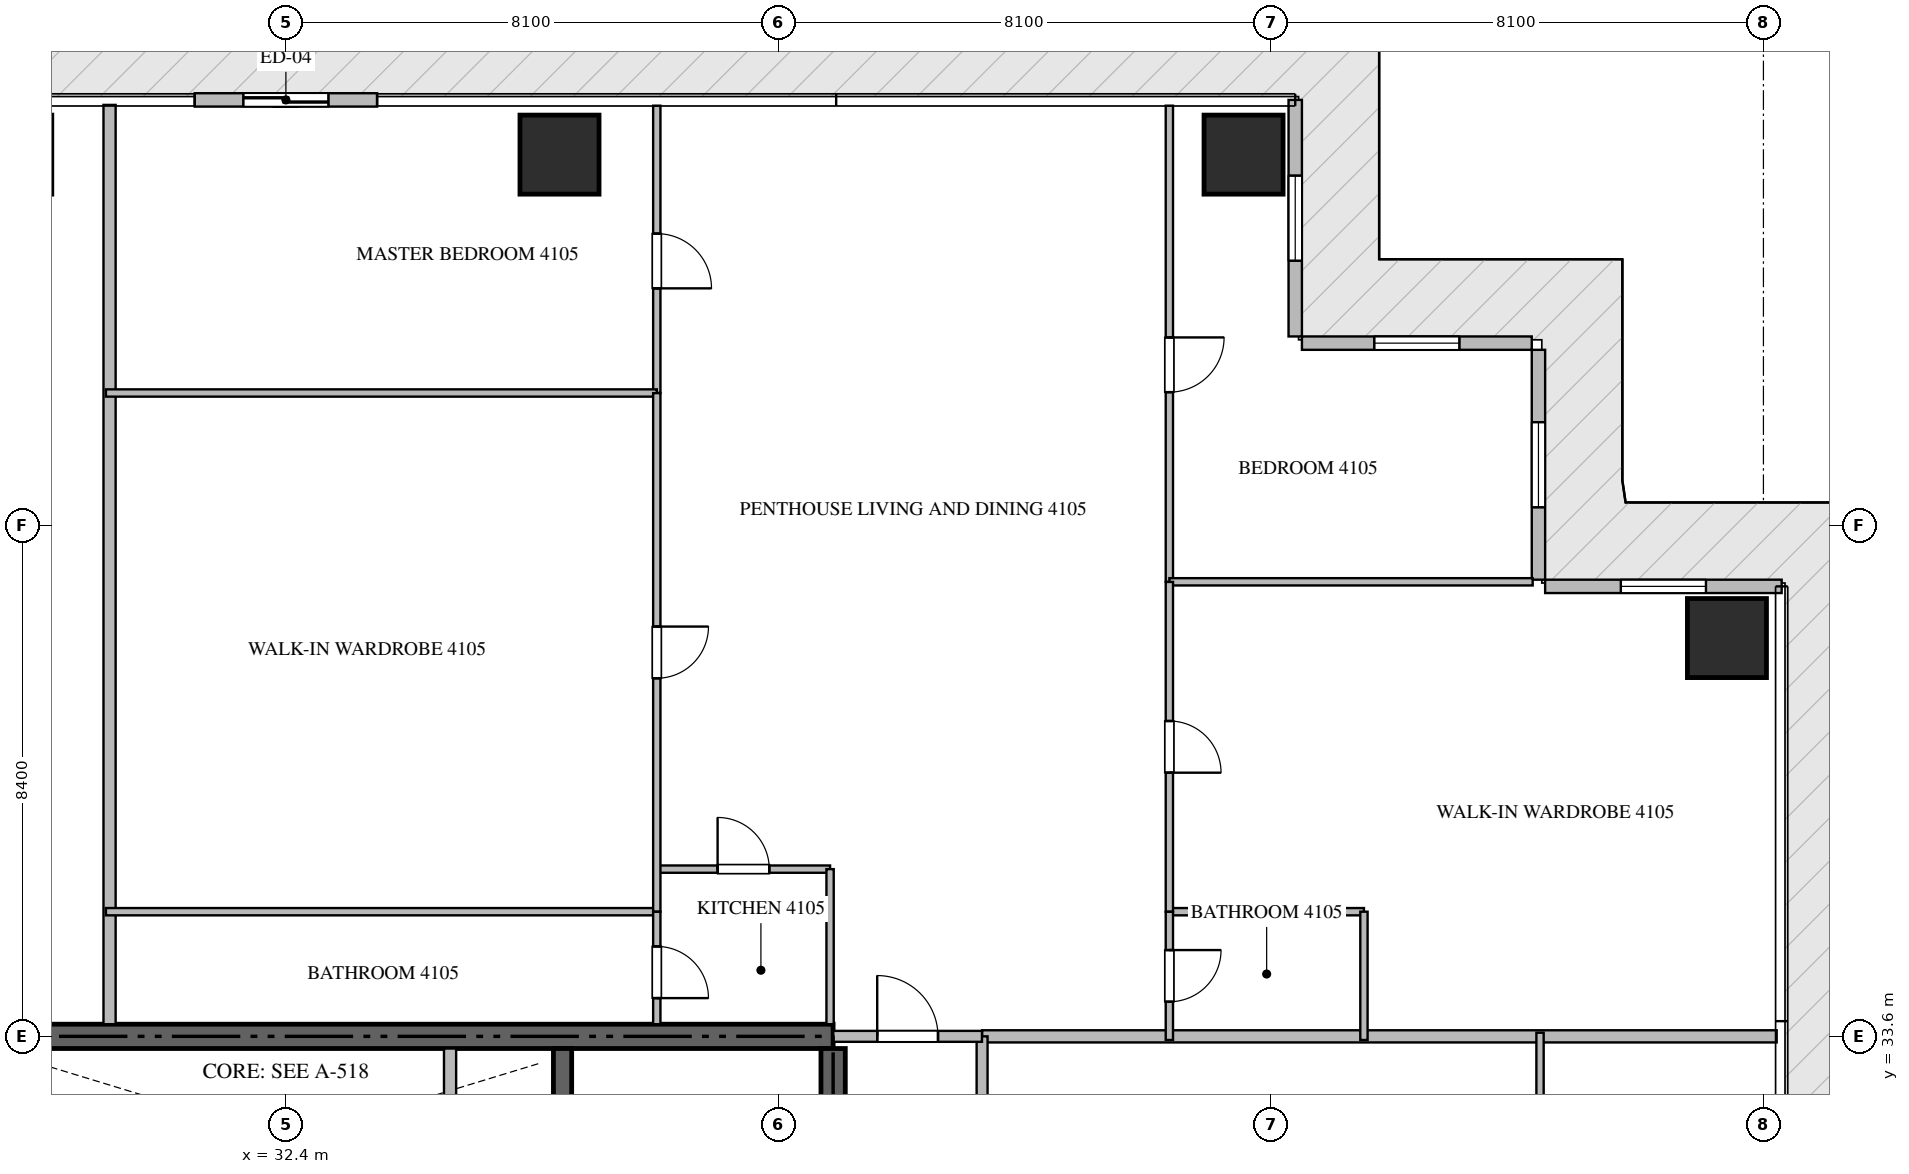
"""IFC4 building model, lengths in metres.
Left out: names, types, materials, properties, quantities, classifications, styles, units other than length and angle.
Written with IfcOpenShell. Run it as: python <this file> out.ifc"""

import sys

from ifc_helpers import new_model, si_unit, direction, frame, frame_2d, origin, origin_2d, place, context, subcontext, project, spatial, rectangle, extrude, source, transform, mapped, element, fill, save


model = new_model("IFC4")
c1 = context("Model", 3, precision=1e-05, world=origin(), true_north=direction((0.0, 1.0)))
c2 = subcontext(c1, "Body", "Model", "MODEL_VIEW")
j1 = project(units=[si_unit("LENGTHUNIT", "METRE"), si_unit("PLANEANGLEUNIT", "RADIAN")], contexts=[c1])
p1 = place(None, origin())
s1 = spatial("IfcSite", under=j1, at=p1, CompositionType="ELEMENT")
p2 = place(p1, origin())
s2 = spatial("IfcBuilding", under=s1, at=p2, CompositionType="ELEMENT")
p3 = place(p2, frame((0.0, 0.0, 165.15)))
s3 = spatial("IfcBuildingStorey", under=s2, at=p3, CompositionType="ELEMENT", Elevation=165.15)
p4 = place(p3, frame((41.4, 33.6, -0.26), z_axis=(0.0, 0.0, 1.0), x_axis=(-1.0, 0.0, 0.0)))
e1 = element("IfcWall", 1, at=p4, inside=s3, PredefinedType="SHEAR", context=c2, shape_type="SweptSolid", body=[
    extrude(rectangle(XDim=18.0, YDim=0.4, at=frame_2d((9.0, 0.0))), origin(), (0.0, 0.0, 1.0), 3.748),
])
p5 = place(p3, frame((41.4, 27.75, -0.26), z_axis=(0.0, 0.0, 1.0), x_axis=(0.0, 1.0, 0.0)))
e2 = element("IfcWall", 2, at=p5, inside=s3, PredefinedType="SHEAR", context=c2, shape_type="SweptSolid", body=[
    extrude(rectangle(XDim=5.65, YDim=0.4, at=frame_2d((2.825, 0.0))), origin(), (0.0, 0.0, 1.0), 3.748),
])
p6 = place(p3, frame((36.95, 27.05, -0.26), z_axis=(0.0, 0.0, 1.0), x_axis=(0.0, 1.0, 0.0)))
e3 = element("IfcWall", 3, at=p6, inside=s3, PredefinedType="SHEAR", context=c2, shape_type="SweptSolid", body=[
    extrude(rectangle(XDim=6.35, YDim=0.3, at=frame_2d((3.175, 0.0))), origin(), (0.0, 0.0, 1.0), 3.748),
])
m1 = source(origin(), c2, "Body", "SweptSolid", [
    extrude(rectangle(XDim=1.3, YDim=1.3, at=origin_2d()), origin(), (0.0, 0.0, 1.0), 3.75),
])
for number, where, z_axis, x_axis in (
    (4, (36.9, 48.1, -0.26), (0.0, 0.0, 1.0), (1.0, 0.0, 0.0)),
    (5, (48.15, 48.1, -0.26), (0.0, 0.0, 1.0), (1.0, 0.0, 0.0)),
    (6, (56.1, 40.15, -0.26), (0.0, 0.0, 1.0), (1.0, 0.0, 0.0)),
):
    element("IfcColumn", number, at=place(p3, frame(where, z_axis=z_axis, x_axis=x_axis)), inside=s3, PredefinedType="COLUMN", context=c2, shape_type="MappedRepresentation", body=[
        mapped(m1, transform((0.0, 0.0, 0.0), scale=1.0)),
    ])
p7 = place(p3, frame((57.0, 41.0, 0.0), z_axis=(0.0, 0.0, 1.0), x_axis=(-1.0, 0.0, 0.0)))
e7 = element("IfcWall", 7, at=p7, inside=s3, PredefinedType="ELEMENTEDWALL", context=c2, shape_type="SweptSolid", body=[
    extrude(rectangle(XDim=3.89, YDim=0.22, at=frame_2d((1.945, 0.0))), origin(), (0.0, 0.0, 1.0), 3.475),
])
p8 = place(p7, frame((1.245, 0.0, 0.65)))
e8 = element("IfcOpeningElement", 8, at=p8, cuts=e7, PredefinedType="OPENING", context=c2, shape_type="SweptSolid", body=[
    extrude(rectangle(XDim=1.4, YDim=2.05, at=frame_2d((0.7, 1.025))), frame((0.0, 0.12, 0.0), z_axis=(0.0, -1.0, 0.0), x_axis=(1.0, 0.0, 0.0)), (0.0, 0.0, 1.0), 0.24),
])
p9 = place(p3, frame((53.0, 41.11, 0.0), z_axis=(0.0, 0.0, 1.0), x_axis=(0.0, 1.0, 0.0)))
e9 = element("IfcWall", 9, at=p9, inside=s3, PredefinedType="ELEMENTEDWALL", context=c2, shape_type="SweptSolid", body=[
    extrude(rectangle(XDim=3.78, YDim=0.22, at=frame_2d((1.89, 0.0))), origin(), (0.0, 0.0, 1.0), 3.475),
])
p10 = place(p9, frame((1.19, 0.0, 0.65)))
e10 = element("IfcOpeningElement", 10, at=p10, cuts=e9, PredefinedType="OPENING", context=c2, shape_type="SweptSolid", body=[
    extrude(rectangle(XDim=1.4, YDim=2.05, at=frame_2d((0.7, 1.025))), frame((0.0, 0.12, 0.0), z_axis=(0.0, -1.0, 0.0), x_axis=(1.0, 0.0, 0.0)), (0.0, 0.0, 1.0), 0.24),
])
p11 = place(p3, frame((52.89, 45.0, 0.0), z_axis=(0.0, 0.0, 1.0), x_axis=(-1.0, 0.0, 0.0)))
e11 = element("IfcWall", 11, at=p11, inside=s3, PredefinedType="ELEMENTEDWALL", context=c2, shape_type="SweptSolid", body=[
    extrude(rectangle(XDim=3.78, YDim=0.22, at=frame_2d((1.89, 0.0))), origin(), (0.0, 0.0, 1.0), 3.475),
])
p12 = place(p11, frame((1.19, 0.0, 0.65)))
e12 = element("IfcOpeningElement", 12, at=p12, cuts=e11, PredefinedType="OPENING", context=c2, shape_type="SweptSolid", body=[
    extrude(rectangle(XDim=1.4, YDim=2.05, at=frame_2d((0.7, 1.025))), frame((0.0, 0.12, 0.0), z_axis=(0.0, -1.0, 0.0), x_axis=(1.0, 0.0, 0.0)), (0.0, 0.0, 1.0), 0.24),
])
p13 = place(p3, frame((49.0, 45.11, 0.0), z_axis=(0.0, 0.0, 1.0), x_axis=(0.0, 1.0, 0.0)))
e13 = element("IfcWall", 13, at=p13, inside=s3, PredefinedType="ELEMENTEDWALL", context=c2, shape_type="SweptSolid", body=[
    extrude(rectangle(XDim=3.89, YDim=0.22, at=frame_2d((1.945, 0.0))), origin(), (0.0, 0.0, 1.0), 3.475),
])
p14 = place(p13, frame((1.245, 0.0, 0.65)))
e14 = element("IfcOpeningElement", 14, at=p14, cuts=e13, PredefinedType="OPENING", context=c2, shape_type="SweptSolid", body=[
    extrude(rectangle(XDim=1.4, YDim=2.05, at=frame_2d((0.7, 1.025))), frame((0.0, 0.12, 0.0), z_axis=(0.0, -1.0, 0.0), x_axis=(1.0, 0.0, 0.0)), (0.0, 0.0, 1.0), 0.24),
])
p15 = place(p3, frame((33.9, 49.0, 0.0), z_axis=(0.0, 0.0, 1.0), x_axis=(-1.0, 0.0, 0.0)))
e15 = element("IfcWall", 15, at=p15, inside=s3, PredefinedType="ELEMENTEDWALL", context=c2, shape_type="SweptSolid", body=[
    extrude(rectangle(XDim=3.0, YDim=0.22, at=frame_2d((1.5, 0.0))), origin(), (0.0, 0.0, 1.0), 3.475),
])
p16 = place(p15, frame((0.8, 0.0, 0.0)))
e16 = element("IfcOpeningElement", 16, at=p16, cuts=e15, PredefinedType="OPENING", context=c2, shape_type="SweptSolid", body=[
    extrude(rectangle(XDim=1.4, YDim=2.25, at=frame_2d((0.7, 1.125))), frame((0.0, 0.12, 0.0), z_axis=(0.0, -1.0, 0.0), x_axis=(1.0, 0.0, 0.0)), (0.0, 0.0, 1.0), 0.24),
])
p17 = place(p3, frame((35.1, 30.75, 0.0), z_axis=(0.0, 0.0, 1.0), x_axis=(0.0, 1.0, 0.0)))
e17 = element("IfcWall", 17, at=p17, inside=s3, PredefinedType="STANDARD", context=c2, shape_type="SweptSolid", body=[
    extrude(rectangle(XDim=2.65, YDim=0.2, at=frame_2d((1.325, 0.0))), origin(), (0.0, 0.0, 1.0), 3.49),
])
p18 = place(p3, frame((29.5, 33.8, 0.0), z_axis=(0.0, 0.0, 1.0), x_axis=(0.0, 1.0, 0.0)))
e18 = element("IfcWall", 18, at=p18, inside=s3, PredefinedType="PARTITIONING", context=c2, shape_type="SweptSolid", body=[
    extrude(rectangle(XDim=15.118, YDim=0.2, at=frame_2d((7.559, 0.0))), origin(), (0.0, 0.0, 1.0), 3.49),
])
p19 = place(p3, frame((43.85, 33.6, 0.0), z_axis=(0.0, 0.0, 1.0), x_axis=(1.0, 0.0, 0.0)))
e19 = element("IfcWall", 19, at=p19, inside=s3, PredefinedType="PARTITIONING", context=c2, shape_type="SweptSolid", body=[
    extrude(rectangle(XDim=13.068, YDim=0.2, at=frame_2d((6.534, 0.0))), origin(), (0.0, 0.0, 1.0), 3.49),
])
p20 = place(p3, frame((43.85, 14.9, 0.0), z_axis=(0.0, 0.0, 1.0), x_axis=(0.0, 1.0, 0.0)))
e20 = element("IfcWall", 20, at=p20, inside=s3, PredefinedType="PARTITIONING", context=c2, shape_type="SweptSolid", body=[
    extrude(rectangle(XDim=18.7, YDim=0.18, at=frame_2d((9.35, 0.0))), origin(), (0.0, 0.0, 1.0), 3.49),
])
p21 = place(p20, frame((1.805, 0.0, 0.0)))
e21 = element("IfcOpeningElement", 21, at=p21, cuts=e20, PredefinedType="OPENING", context=c2, shape_type="SweptSolid", body=[
    extrude(rectangle(XDim=1.0, YDim=2.15, at=frame_2d((0.5, 1.075))), frame((0.0, 0.1, 0.0), z_axis=(0.0, -1.0, 0.0), x_axis=(1.0, 0.0, 0.0)), (0.0, 0.0, 1.0), 0.2),
])
p22 = place(p3, frame((41.402, 33.6, 0.0), z_axis=(0.0, 0.0, 1.0), x_axis=(1.0, 0.0, 0.0)))
e22 = element("IfcWall", 22, at=p22, inside=s3, PredefinedType="PARTITIONING", context=c2, shape_type="SweptSolid", body=[
    extrude(rectangle(XDim=2.446, YDim=0.18, at=frame_2d((1.223, 0.0))), origin(), (0.0, 0.0, 1.0), 3.49),
])
p23 = place(p22, frame((0.723, 0.0, 0.0)))
e23 = element("IfcOpeningElement", 23, at=p23, cuts=e22, PredefinedType="OPENING", context=c2, shape_type="SweptSolid", body=[
    extrude(rectangle(XDim=1.0, YDim=2.15, at=frame_2d((0.5, 1.075))), frame((0.0, 0.1, 0.0), z_axis=(0.0, -1.0, 0.0), x_axis=(1.0, 0.0, 0.0)), (0.0, 0.0, 1.0), 0.2),
])
p24 = place(p3, frame((38.5, 36.35, 0.0), z_axis=(0.0, 0.0, 1.0), x_axis=(1.0, 0.0, 0.0)))
e24 = element("IfcWall", 24, at=p24, inside=s3, PredefinedType="PARTITIONING", context=c2, shape_type="SweptSolid", body=[
    extrude(rectangle(XDim=2.85, YDim=0.12, at=frame_2d((1.425, 0.0))), origin(), (0.0, 0.0, 1.0), 3.49),
])
p25 = place(p24, frame((1.0, 0.0, 0.0)))
e25 = element("IfcOpeningElement", 25, at=p25, cuts=e24, PredefinedType="OPENING", context=c2, shape_type="SweptSolid", body=[
    extrude(rectangle(XDim=0.85, YDim=2.1, at=frame_2d((0.425, 1.05))), frame((0.0, 0.07, 0.0), z_axis=(0.0, -1.0, 0.0), x_axis=(1.0, 0.0, 0.0)), (0.0, 0.0, 1.0), 0.14),
])
p26 = place(p3, frame((41.35, 36.35, 0.0), z_axis=(0.0, 0.0, 1.0), x_axis=(0.0, -1.0, 0.0)))
e26 = element("IfcWall", 26, at=p26, inside=s3, PredefinedType="PARTITIONING", context=c2, shape_type="SweptSolid", body=[
    extrude(rectangle(XDim=2.55, YDim=0.12, at=frame_2d((1.275, 0.0))), origin(), (0.0, 0.0, 1.0), 3.49),
])
p27 = place(p3, frame((38.5, 48.905, 0.0), z_axis=(0.0, 0.0, 1.0), x_axis=(0.0, -1.0, 0.0)))
e27 = element("IfcWall", 27, at=p27, inside=s3, PredefinedType="PARTITIONING", context=c2, shape_type="SweptSolid", body=[
    extrude(rectangle(XDim=4.725, YDim=0.12, at=frame_2d((2.363, 0.0))), origin(), (0.0, 0.0, 1.0), 3.49),
])
p28 = place(p27, frame((2.104, 0.0, 0.0)))
e28 = element("IfcOpeningElement", 28, at=p28, cuts=e27, PredefinedType="OPENING", context=c2, shape_type="SweptSolid", body=[
    extrude(rectangle(XDim=0.9, YDim=2.1, at=frame_2d((0.45, 1.05))), frame((0.0, 0.07, 0.0), z_axis=(0.0, -1.0, 0.0), x_axis=(1.0, 0.0, 0.0)), (0.0, 0.0, 1.0), 0.14),
])
for number, where, z_axis, x_axis in (
    (29, (29.44, 44.18, 0.0), (0.0, 0.0, 1.0), (1.0, 0.0, 0.0)),
    (30, (29.44, 35.65, 0.0), (0.0, 0.0, 1.0), (1.0, 0.0, 0.0)),
):
    element("IfcWall", number, at=place(p3, frame(where, z_axis=z_axis, x_axis=x_axis)), inside=s3, PredefinedType="PARTITIONING", context=c2, shape_type="SweptSolid", body=[
        extrude(rectangle(XDim=9.06, YDim=0.12, at=frame_2d((4.53, 0.0))), origin(), (0.0, 0.0, 1.0), 3.49),
    ])
p29 = place(p3, frame((38.5, 44.178, 0.0), z_axis=(0.0, 0.0, 1.0), x_axis=(0.0, -1.0, 0.0)))
e31 = element("IfcWall", 31, at=p29, inside=s3, PredefinedType="PARTITIONING", context=c2, shape_type="SweptSolid", body=[
    extrude(rectangle(XDim=8.528, YDim=0.12, at=frame_2d((4.264, 0.0))), origin(), (0.0, 0.0, 1.0), 3.49),
])
p30 = place(p29, frame((3.839, 0.0, 0.0)))
e32 = element("IfcOpeningElement", 32, at=p30, cuts=e31, PredefinedType="OPENING", context=c2, shape_type="SweptSolid", body=[
    extrude(rectangle(XDim=0.85, YDim=2.1, at=frame_2d((0.425, 1.05))), frame((0.0, 0.07, 0.0), z_axis=(0.0, -1.0, 0.0), x_axis=(1.0, 0.0, 0.0)), (0.0, 0.0, 1.0), 0.14),
])
p31 = place(p3, frame((38.5, 35.648, 0.0), z_axis=(0.0, 0.0, 1.0), x_axis=(0.0, -1.0, 0.0)))
e33 = element("IfcWall", 33, at=p31, inside=s3, PredefinedType="PARTITIONING", context=c2, shape_type="SweptSolid", body=[
    extrude(rectangle(XDim=1.848, YDim=0.12, at=frame_2d((0.924, 0.0))), origin(), (0.0, 0.0, 1.0), 3.49),
])
p32 = place(p31, frame((0.569, 0.0, 0.0)))
e34 = element("IfcOpeningElement", 34, at=p32, cuts=e33, PredefinedType="OPENING", context=c2, shape_type="SweptSolid", body=[
    extrude(rectangle(XDim=0.85, YDim=2.1, at=frame_2d((0.425, 1.05))), frame((0.0, 0.07, 0.0), z_axis=(0.0, -1.0, 0.0), x_axis=(1.0, 0.0, 0.0)), (0.0, 0.0, 1.0), 0.14),
])
p33 = place(p3, frame((46.93, 48.905, 0.0), z_axis=(0.0, 0.0, 1.0), x_axis=(0.0, -1.0, 0.0)))
e35 = element("IfcWall", 35, at=p33, inside=s3, PredefinedType="PARTITIONING", context=c2, shape_type="SweptSolid", body=[
    extrude(rectangle(XDim=7.83, YDim=0.12, at=frame_2d((3.915, 0.0))), origin(), (0.0, 0.0, 1.0), 3.49),
])
p34 = place(p33, frame((3.811, 0.0, 0.0)))
e36 = element("IfcOpeningElement", 36, at=p34, cuts=e35, PredefinedType="OPENING", context=c2, shape_type="SweptSolid", body=[
    extrude(rectangle(XDim=0.9, YDim=2.1, at=frame_2d((0.45, 1.05))), frame((0.0, 0.07, 0.0), z_axis=(0.0, -1.0, 0.0), x_axis=(1.0, 0.0, 0.0)), (0.0, 0.0, 1.0), 0.14),
])
p35 = place(p3, frame((46.93, 41.075, 0.0), z_axis=(0.0, 0.0, 1.0), x_axis=(1.0, 0.0, 0.0)))
e37 = element("IfcWall", 37, at=p35, inside=s3, PredefinedType="PARTITIONING", context=c2, shape_type="SweptSolid", body=[
    extrude(rectangle(XDim=5.975, YDim=0.12, at=frame_2d((2.988, 0.0))), origin(), (0.0, 0.0, 1.0), 3.49),
])
p36 = place(p3, frame((46.93, 35.65, 0.0), z_axis=(0.0, 0.0, 1.0), x_axis=(1.0, 0.0, 0.0)))
e38 = element("IfcWall", 38, at=p36, inside=s3, PredefinedType="PARTITIONING", context=c2, shape_type="SweptSolid", body=[
    extrude(rectangle(XDim=3.2, YDim=0.12, at=frame_2d((1.6, 0.0))), origin(), (0.0, 0.0, 1.0), 3.49),
])
p37 = place(p3, frame((50.13, 35.65, 0.0), z_axis=(0.0, 0.0, 1.0), x_axis=(0.0, -1.0, 0.0)))
e39 = element("IfcWall", 39, at=p37, inside=s3, PredefinedType="PARTITIONING", context=c2, shape_type="SweptSolid", body=[
    extrude(rectangle(XDim=2.11, YDim=0.12, at=frame_2d((1.055, 0.0))), origin(), (0.0, 0.0, 1.0), 3.49),
])
p38 = place(p3, frame((46.93, 41.073, 0.0), z_axis=(0.0, 0.0, 1.0), x_axis=(0.0, -1.0, 0.0)))
e40 = element("IfcWall", 40, at=p38, inside=s3, PredefinedType="PARTITIONING", context=c2, shape_type="SweptSolid", body=[
    extrude(rectangle(XDim=5.423, YDim=0.12, at=frame_2d((2.711, 0.0))), origin(), (0.0, 0.0, 1.0), 3.49),
])
p39 = place(p38, frame((2.287, 0.0, 0.0)))
e41 = element("IfcOpeningElement", 41, at=p39, cuts=e40, PredefinedType="OPENING", context=c2, shape_type="SweptSolid", body=[
    extrude(rectangle(XDim=0.85, YDim=2.1, at=frame_2d((0.425, 1.05))), frame((0.0, 0.07, 0.0), z_axis=(0.0, -1.0, 0.0), x_axis=(1.0, 0.0, 0.0)), (0.0, 0.0, 1.0), 0.14),
])
p40 = place(p3, frame((46.93, 35.648, 0.0), z_axis=(0.0, 0.0, 1.0), x_axis=(0.0, -1.0, 0.0)))
e42 = element("IfcWall", 42, at=p40, inside=s3, PredefinedType="PARTITIONING", context=c2, shape_type="SweptSolid", body=[
    extrude(rectangle(XDim=2.108, YDim=0.12, at=frame_2d((1.054, 0.0))), origin(), (0.0, 0.0, 1.0), 3.49),
])
p41 = place(p40, frame((0.629, 0.0, 0.0)))
e43 = element("IfcOpeningElement", 43, at=p41, cuts=e42, PredefinedType="OPENING", context=c2, shape_type="SweptSolid", body=[
    extrude(rectangle(XDim=0.85, YDim=2.1, at=frame_2d((0.425, 1.05))), frame((0.0, 0.07, 0.0), z_axis=(0.0, -1.0, 0.0), x_axis=(1.0, 0.0, 0.0)), (0.0, 0.0, 1.0), 0.14),
])
p42 = place(p3, frame((53.026, 22.6, 0.0), z_axis=(0.0, 0.0, 1.0), x_axis=(0.0, 1.0, 0.0)))
e44 = element("IfcWall", 44, at=p42, inside=s3, PredefinedType="PARTITIONING", context=c2, shape_type="SweptSolid", body=[
    extrude(rectangle(XDim=11.06, YDim=0.12, at=frame_2d((5.53, 0.0))), origin(), (0.0, 0.0, 1.0), 3.49),
])
m2 = source(origin(), c2, "Body", "SweptSolid", [
    extrude(rectangle(XDim=1.4, YDim=2.05, at=frame_2d((0.7, 1.025))), frame((0.0, 0.03, 0.0), z_axis=(0.0, -1.0, 0.0), x_axis=(1.0, 0.0, 0.0)), (0.0, 0.0, 1.0), 0.06),
])
p43 = place(p8, origin())
e45 = element("IfcWindow", 45, at=p43, inside=s3, PartitioningType="SINGLE_PANEL", PredefinedType="WINDOW", context=c2, shape_type="MappedRepresentation", body=[
    mapped(m2, transform((0.0, 0.0, 0.0), scale=1.0)),
])
fill(e8, e45)
p44 = place(p10, origin())
e46 = element("IfcWindow", 46, at=p44, inside=s3, PartitioningType="SINGLE_PANEL", PredefinedType="WINDOW", context=c2, shape_type="MappedRepresentation", body=[
    mapped(m2, transform((0.0, 0.0, 0.0), scale=1.0)),
])
fill(e10, e46)
p45 = place(p12, origin())
e47 = element("IfcWindow", 47, at=p45, inside=s3, PartitioningType="SINGLE_PANEL", PredefinedType="WINDOW", context=c2, shape_type="MappedRepresentation", body=[
    mapped(m2, transform((0.0, 0.0, 0.0), scale=1.0)),
])
fill(e12, e47)
p46 = place(p14, origin())
e48 = element("IfcWindow", 48, at=p46, inside=s3, PartitioningType="SINGLE_PANEL", PredefinedType="WINDOW", context=c2, shape_type="MappedRepresentation", body=[
    mapped(m2, transform((0.0, 0.0, 0.0), scale=1.0)),
])
fill(e14, e48)
m3 = source(origin(), c2, "Body", "SweptSolid", [
    extrude(rectangle(XDim=1.4, YDim=2.25, at=frame_2d((0.7, 1.125))), frame((0.0, 0.025, 0.0), z_axis=(0.0, -1.0, 0.0), x_axis=(1.0, 0.0, 0.0)), (0.0, 0.0, 1.0), 0.05),
])
p47 = place(p16, origin())
e49 = element("IfcDoor", 49, at=p47, inside=s3, OperationType="SLIDING_TO_LEFT", PredefinedType="DOOR", context=c2, shape_type="MappedRepresentation", body=[
    mapped(m3, transform((0.0, 0.0, 0.0), scale=1.0)),
])
fill(e16, e49)
m4 = source(origin(), c2, "Body", "SweptSolid", [
    extrude(rectangle(XDim=1.0, YDim=2.15, at=frame_2d((0.5, 1.075))), frame((0.0, 0.025, 0.0), z_axis=(0.0, -1.0, 0.0), x_axis=(1.0, 0.0, 0.0)), (0.0, 0.0, 1.0), 0.05),
])
p48 = place(p23, origin())
e50 = element("IfcDoor", 50, at=p48, inside=s3, OperationType="SINGLE_SWING_LEFT", PredefinedType="DOOR", context=c2, shape_type="MappedRepresentation", body=[
    mapped(m4, transform((0.0, 0.0, 0.0), scale=1.0)),
])
fill(e23, e50)
m5 = source(origin(), c2, "Body", "SweptSolid", [
    extrude(rectangle(XDim=0.85, YDim=2.1, at=frame_2d((0.425, 1.05))), frame((0.0, 0.025, 0.0), z_axis=(0.0, -1.0, 0.0), x_axis=(1.0, 0.0, 0.0)), (0.0, 0.0, 1.0), 0.05),
])
p49 = place(p25, origin())
e51 = element("IfcDoor", 51, at=p49, inside=s3, OperationType="SINGLE_SWING_LEFT", PredefinedType="DOOR", context=c2, shape_type="MappedRepresentation", body=[
    mapped(m5, transform((0.0, 0.0, 0.0), scale=1.0)),
])
fill(e25, e51)
m6 = source(origin(), c2, "Body", "SweptSolid", [
    extrude(rectangle(XDim=0.9, YDim=2.1, at=frame_2d((0.45, 1.05))), frame((0.0, 0.025, 0.0), z_axis=(0.0, -1.0, 0.0), x_axis=(1.0, 0.0, 0.0)), (0.0, 0.0, 1.0), 0.05),
])
p50 = place(p28, origin())
e52 = element("IfcDoor", 52, at=p50, inside=s3, OperationType="SINGLE_SWING_RIGHT", PredefinedType="DOOR", context=c2, shape_type="MappedRepresentation", body=[
    mapped(m6, transform((0.0, 0.0, 0.0), scale=1.0)),
])
fill(e28, e52)
p51 = place(p30, origin())
e53 = element("IfcDoor", 53, at=p51, inside=s3, OperationType="SINGLE_SWING_LEFT", PredefinedType="DOOR", context=c2, shape_type="MappedRepresentation", body=[
    mapped(m5, transform((0.0, 0.0, 0.0), scale=1.0)),
])
fill(e32, e53)
p52 = place(p32, origin())
e54 = element("IfcDoor", 54, at=p52, inside=s3, OperationType="SINGLE_SWING_RIGHT", PredefinedType="DOOR", context=c2, shape_type="MappedRepresentation", body=[
    mapped(m5, transform((0.0, 0.0, 0.0), scale=1.0)),
])
fill(e34, e54)
p53 = place(p34, origin())
e55 = element("IfcDoor", 55, at=p53, inside=s3, OperationType="SINGLE_SWING_LEFT", PredefinedType="DOOR", context=c2, shape_type="MappedRepresentation", body=[
    mapped(m6, transform((0.0, 0.0, 0.0), scale=1.0)),
])
fill(e36, e55)
p54 = place(p39, origin())
e56 = element("IfcDoor", 56, at=p54, inside=s3, OperationType="SINGLE_SWING_RIGHT", PredefinedType="DOOR", context=c2, shape_type="MappedRepresentation", body=[
    mapped(m5, transform((0.0, 0.0, 0.0), scale=1.0)),
])
fill(e41, e56)
p55 = place(p41, origin())
e57 = element("IfcDoor", 57, at=p55, inside=s3, OperationType="SINGLE_SWING_LEFT", PredefinedType="DOOR", context=c2, shape_type="MappedRepresentation", body=[
    mapped(m5, transform((0.0, 0.0, 0.0), scale=1.0)),
])
fill(e43, e57)
save(model, sys.argv[1])
